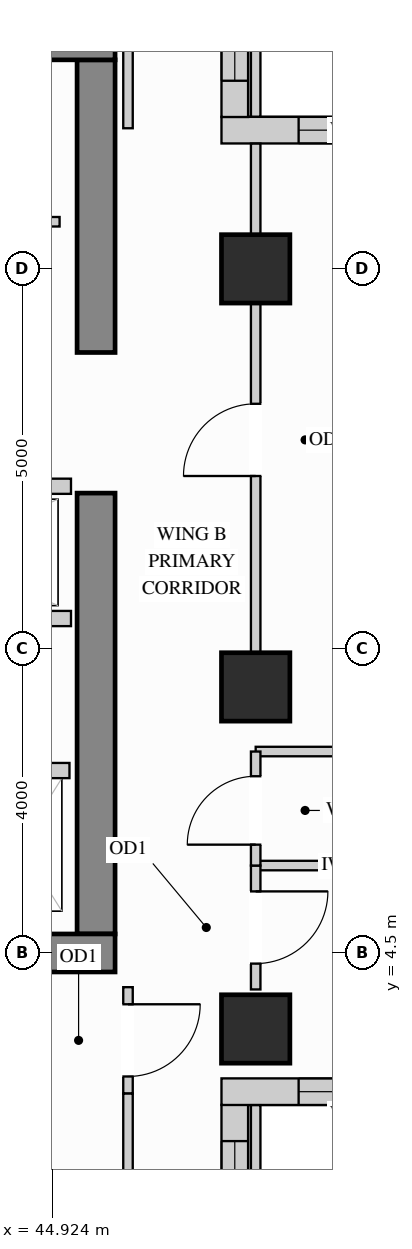
"""IFC4 building model, lengths in metres.
Left out: names, types, materials, properties, quantities, classifications, styles, units other than length and angle.
Written with IfcOpenShell. Run it as: python <this file> out.ifc"""

import sys

from ifc_helpers import new_model, si_unit, direction, frame, frame_2d, origin, origin_2d, place, context, subcontext, project, spatial, rectangle, extrude, source, transform, mapped, element, fill, save


model = new_model("IFC4")
c1 = context("Model", 3, precision=1e-05, world=origin(), true_north=direction((0.0, 1.0)))
c2 = subcontext(c1, "Body", "Model", "MODEL_VIEW")
j1 = project(units=[si_unit("LENGTHUNIT", "METRE"), si_unit("PLANEANGLEUNIT", "RADIAN")], contexts=[c1])
p1 = place(None, origin())
s1 = spatial("IfcSite", under=j1, at=p1, CompositionType="ELEMENT")
p2 = place(p1, origin())
s2 = spatial("IfcBuilding", under=s1, at=p2, CompositionType="ELEMENT")
p3 = place(p2, frame((0.0, 0.0, 212.4)))
s3 = spatial("IfcBuildingStorey", under=s2, at=p3, CompositionType="ELEMENT", Elevation=212.4)
m1 = source(origin(), c2, "Body", "SweptSolid", [
    extrude(rectangle(XDim=0.9, YDim=0.9, at=origin_2d()), origin(), (0.0, 0.0, 1.0), 3.4),
])
for number, where, z_axis, x_axis in (
    (1, (47.6, 13.5, 0.0), (0.0, 0.0, 1.0), (1.0, 0.0, 0.0)),
    (2, (47.6, 3.5, 0.0), (0.0, 0.0, 1.0), (1.0, 0.0, 0.0)),
    (3, (47.6, 8.0, 0.0), (0.0, 0.0, 1.0), (1.0, 0.0, 0.0)),
):
    element("IfcColumn", number, at=place(p3, frame(where, z_axis=z_axis, x_axis=x_axis)), inside=s3, PredefinedType="COLUMN", context=c2, shape_type="MappedRepresentation", body=[
        mapped(m1, transform((0.0, 0.0, 0.0), x_axis=(1.0, 0.0, 0.0), y_axis=(0.0, 1.0, 0.0), z_axis=(0.0, 0.0, 1.0))),
    ])
m2 = source(origin(), c2, "Body", "SweptSolid", [
    extrude(rectangle(XDim=5.8, YDim=0.5, at=frame_2d((2.9, 0.0))), origin(), (0.0, 0.0, 1.0), 3.4),
])
p4 = place(p3, frame((45.5, 4.75, 0.0), z_axis=(0.0, 0.0, 1.0), x_axis=(0.0, 1.0, 0.0)))
e4 = element("IfcWall", 4, at=p4, inside=s3, PredefinedType="SHEAR", context=c2, shape_type="MappedRepresentation", body=[
    mapped(m2, transform((0.0, 0.0, 0.0), x_axis=(1.0, 0.0, 0.0), y_axis=(0.0, 1.0, 0.0), z_axis=(0.0, 0.0, 1.0))),
])
m3 = source(origin(), c2, "Body", "SweptSolid", [
    extrude(rectangle(XDim=3.85, YDim=0.5, at=frame_2d((1.925, 0.0))), origin(), (0.0, 0.0, 1.0), 3.4),
])
p5 = place(p3, frame((45.5, 12.4, 0.0), z_axis=(0.0, 0.0, 1.0), x_axis=(0.0, 1.0, 0.0)))
e5 = element("IfcWall", 5, at=p5, inside=s3, PredefinedType="SHEAR", context=c2, shape_type="MappedRepresentation", body=[
    mapped(m3, transform((0.0, 0.0, 0.0), x_axis=(1.0, 0.0, 0.0), y_axis=(0.0, 1.0, 0.0), z_axis=(0.0, 0.0, 1.0))),
])
m4 = source(origin(), c2, "Body", "SweptSolid", [
    extrude(rectangle(XDim=10.0, YDim=0.5, at=frame_2d((5.0, 0.0))), origin(), (0.0, 0.0, 1.0), 3.4),
])
for number, where, z_axis, x_axis in (
    (6, (35.75, 16.5, 0.0), (0.0, 0.0, 1.0), (1.0, 0.0, 0.0)),
    (7, (35.75, 4.5, 0.0), (0.0, 0.0, 1.0), (1.0, 0.0, 0.0)),
):
    element("IfcWall", number, at=place(p3, frame(where, z_axis=z_axis, x_axis=x_axis)), inside=s3, PredefinedType="SHEAR", context=c2, shape_type="MappedRepresentation", body=[
        mapped(m4, transform((0.0, 0.0, 0.0), x_axis=(1.0, 0.0, 0.0), y_axis=(0.0, 1.0, 0.0), z_axis=(0.0, 0.0, 1.0))),
    ])
p6 = place(p3, frame((47.325, 0.348, 0.0), z_axis=(0.0, 0.0, 1.0), x_axis=(0.0, 1.0, 0.0)))
e8 = element("IfcWall", 8, at=p6, inside=s3, PredefinedType="SOLIDWALL", context=c2, shape_type="SweptSolid", body=[
    extrude(rectangle(XDim=2.154, YDim=0.35, at=frame_2d((1.077, 0.0))), origin(), (0.0, 0.0, 1.0), 3.385),
])
p7 = place(p6, frame((0.477, 0.0, 0.78)))
e9 = element("IfcOpeningElement", 9, at=p7, cuts=e8, PredefinedType="OPENING", context=c2, shape_type="SweptSolid", body=[
    extrude(rectangle(XDim=1.2, YDim=2.1, at=frame_2d((0.6, 1.05))), frame((0.0, 0.185, 0.0), z_axis=(0.0, -1.0, 0.0), x_axis=(1.0, 0.0, 0.0)), (0.0, 0.0, 1.0), 0.37),
])
p8 = place(p3, frame((47.15, 2.675, 0.0), z_axis=(0.0, 0.0, 1.0), x_axis=(1.0, 0.0, 0.0)))
e10 = element("IfcWall", 10, at=p8, inside=s3, PredefinedType="SOLIDWALL", context=c2, shape_type="SweptSolid", body=[
    extrude(rectangle(XDim=2.85, YDim=0.35, at=frame_2d((1.425, 0.0))), origin(), (0.0, 0.0, 1.0), 3.385),
])
p9 = place(p8, frame((1.015, 0.0, 0.78)))
e11 = element("IfcOpeningElement", 11, at=p9, cuts=e10, PredefinedType="OPENING", context=c2, shape_type="SweptSolid", body=[
    extrude(rectangle(XDim=1.2, YDim=2.1, at=frame_2d((0.6, 1.05))), frame((0.0, 0.185, 0.0), z_axis=(0.0, -1.0, 0.0), x_axis=(1.0, 0.0, 0.0)), (0.0, 0.0, 1.0), 0.37),
])
p10 = place(p3, frame((50.0, 15.325, 0.0), z_axis=(0.0, 0.0, 1.0), x_axis=(-1.0, 0.0, 0.0)))
e12 = element("IfcWall", 12, at=p10, inside=s3, PredefinedType="SOLIDWALL", context=c2, shape_type="SweptSolid", body=[
    extrude(rectangle(XDim=2.85, YDim=0.35, at=frame_2d((1.425, 0.0))), origin(), (0.0, 0.0, 1.0), 3.385),
])
p11 = place(p10, frame((0.635, 0.0, 0.78)))
e13 = element("IfcOpeningElement", 13, at=p11, cuts=e12, PredefinedType="OPENING", context=c2, shape_type="SweptSolid", body=[
    extrude(rectangle(XDim=1.2, YDim=2.1, at=frame_2d((0.6, 1.05))), frame((0.0, 0.185, 0.0), z_axis=(0.0, -1.0, 0.0), x_axis=(1.0, 0.0, 0.0)), (0.0, 0.0, 1.0), 0.37),
])
p12 = place(p3, frame((47.325, 15.498, 0.0), z_axis=(0.0, 0.0, 1.0), x_axis=(0.0, 1.0, 0.0)))
e14 = element("IfcWall", 14, at=p12, inside=s3, PredefinedType="SOLIDWALL", context=c2, shape_type="SweptSolid", body=[
    extrude(rectangle(XDim=2.154, YDim=0.35, at=frame_2d((1.077, 0.0))), origin(), (0.0, 0.0, 1.0), 3.385),
])
p13 = place(p12, frame((0.477, 0.0, 0.78)))
e15 = element("IfcOpeningElement", 15, at=p13, cuts=e14, PredefinedType="OPENING", context=c2, shape_type="SweptSolid", body=[
    extrude(rectangle(XDim=1.2, YDim=2.1, at=frame_2d((0.6, 1.05))), frame((0.0, 0.185, 0.0), z_axis=(0.0, -1.0, 0.0), x_axis=(1.0, 0.0, 0.0)), (0.0, 0.0, 1.0), 0.37),
])
p14 = place(p3, frame((36.5, 14.12, 0.0), z_axis=(0.0, 0.0, 1.0), x_axis=(1.0, 0.0, 0.0)))
e16 = element("IfcWall", 16, at=p14, inside=s3, PredefinedType="PARTITIONING", context=c2, shape_type="SweptSolid", body=[
    extrude(rectangle(XDim=8.52, YDim=0.125, at=frame_2d((4.26, 0.0))), origin(), (0.0, 0.0, 1.0), 3.385),
])
p15 = place(p14, frame((3.785, 0.0, 0.0)))
e17 = element("IfcOpeningElement", 17, at=p15, cuts=e16, PredefinedType="OPENING", context=c2, shape_type="SweptSolid", body=[
    extrude(rectangle(XDim=0.95, YDim=2.15, at=frame_2d((0.475, 1.075))), frame((0.0, 0.073, 0.0), z_axis=(0.0, -1.0, 0.0), x_axis=(1.0, 0.0, 0.0)), (0.0, 0.0, 1.0), 0.145),
])
m5 = source(origin(), c2, "Body", "SweptSolid", [
    extrude(rectangle(XDim=2.048, YDim=0.125, at=frame_2d((1.024, 0.0))), origin(), (0.0, 0.0, 1.0), 3.385),
])
for number, where, z_axis, x_axis in (
    (18, (47.6, 5.65, 0.0), (0.0, 0.0, 1.0), (1.0, 0.0, 0.0)),
    (19, (47.6, 7.15, 0.0), (0.0, 0.0, 1.0), (1.0, 0.0, 0.0)),
):
    element("IfcWall", number, at=place(p3, frame(where, z_axis=z_axis, x_axis=x_axis)), inside=s3, PredefinedType="PARTITIONING", context=c2, shape_type="MappedRepresentation", body=[
        mapped(m5, transform((0.0, 0.0, 0.0), x_axis=(1.0, 0.0, 0.0), y_axis=(0.0, 1.0, 0.0), z_axis=(0.0, 0.0, 1.0))),
    ])
p16 = place(p3, frame((47.6, 4.02, 0.0), z_axis=(0.0, 0.0, 1.0), x_axis=(0.0, 1.0, 0.0)))
e20 = element("IfcWall", 20, at=p16, inside=s3, PredefinedType="PARTITIONING", context=c2, shape_type="SweptSolid", body=[
    extrude(rectangle(XDim=1.63, YDim=0.125, at=frame_2d((0.815, 0.0))), origin(), (0.0, 0.0, 1.0), 2.773),
])
p17 = place(p16, frame((0.34, 0.0, 0.0)))
e21 = element("IfcOpeningElement", 21, at=p17, cuts=e20, PredefinedType="OPENING", context=c2, shape_type="SweptSolid", body=[
    extrude(rectangle(XDim=0.95, YDim=2.15, at=frame_2d((0.475, 1.075))), frame((0.0, 0.073, 0.0), z_axis=(0.0, -1.0, 0.0), x_axis=(1.0, 0.0, 0.0)), (0.0, 0.0, 1.0), 0.145),
])
m6 = source(origin(), c2, "Body", "SweptSolid", [
    extrude(rectangle(XDim=2.148, YDim=0.125, at=frame_2d((1.074, 0.0))), origin(), (0.0, 0.0, 1.0), 3.385),
])
p18 = place(p3, frame((47.6, 0.35, 0.0), z_axis=(0.0, 0.0, 1.0), x_axis=(0.0, 1.0, 0.0)))
e22 = element("IfcWall", 22, at=p18, inside=s3, PredefinedType="PARTITIONING", context=c2, shape_type="MappedRepresentation", body=[
    mapped(m6, transform((0.0, 0.0, 0.0), x_axis=(1.0, 0.0, 0.0), y_axis=(0.0, 1.0, 0.0), z_axis=(0.0, 0.0, 1.0))),
])
p19 = place(p3, frame((47.6, 8.45, 0.0), z_axis=(0.0, 0.0, 1.0), x_axis=(0.0, 1.0, 0.0)))
e23 = element("IfcWall", 23, at=p19, inside=s3, PredefinedType="PARTITIONING", context=c2, shape_type="SweptSolid", body=[
    extrude(rectangle(XDim=4.6, YDim=0.125, at=frame_2d((2.3, 0.0))), origin(), (0.0, 0.0, 1.0), 2.773),
])
p20 = place(p19, frame((2.325, 0.0, 0.0)))
e24 = element("IfcOpeningElement", 24, at=p20, cuts=e23, PredefinedType="OPENING", context=c2, shape_type="SweptSolid", body=[
    extrude(rectangle(XDim=0.95, YDim=2.15, at=frame_2d((0.475, 1.075))), frame((0.0, 0.073, 0.0), z_axis=(0.0, -1.0, 0.0), x_axis=(1.0, 0.0, 0.0)), (0.0, 0.0, 1.0), 0.145),
])
m7 = source(origin(), c2, "Body", "SweptSolid", [
    extrude(rectangle(XDim=1.198, YDim=0.125, at=frame_2d((0.599, 0.0))), origin(), (0.0, 0.0, 1.0), 3.385),
])
p21 = place(p3, frame((47.6, 13.95, 0.0), z_axis=(0.0, 0.0, 1.0), x_axis=(0.0, 1.0, 0.0)))
e25 = element("IfcWall", 25, at=p21, inside=s3, PredefinedType="PARTITIONING", context=c2, shape_type="MappedRepresentation", body=[
    mapped(m7, transform((0.0, 0.0, 0.0), x_axis=(1.0, 0.0, 0.0), y_axis=(0.0, 1.0, 0.0), z_axis=(0.0, 0.0, 1.0))),
])
p22 = place(p3, frame((47.6, 15.502, 0.0), z_axis=(0.0, 0.0, 1.0), x_axis=(0.0, 1.0, 0.0)))
e26 = element("IfcWall", 26, at=p22, inside=s3, PredefinedType="PARTITIONING", context=c2, shape_type="MappedRepresentation", body=[
    mapped(m6, transform((0.0, 0.0, 0.0), x_axis=(1.0, 0.0, 0.0), y_axis=(0.0, 1.0, 0.0), z_axis=(0.0, 0.0, 1.0))),
])
p23 = place(p3, frame((47.6, 5.65, 0.0), z_axis=(0.0, 0.0, 1.0), x_axis=(0.0, 1.0, 0.0)))
e27 = element("IfcWall", 27, at=p23, inside=s3, PredefinedType="PARTITIONING", context=c2, shape_type="SweptSolid", body=[
    extrude(rectangle(XDim=1.5, YDim=0.125, at=frame_2d((0.75, 0.0))), origin(), (0.0, 0.0, 1.0), 2.773),
])
p24 = place(p23, frame((0.275, 0.0, 0.0)))
e28 = element("IfcOpeningElement", 28, at=p24, cuts=e27, PredefinedType="OPENING", context=c2, shape_type="SweptSolid", body=[
    extrude(rectangle(XDim=0.9, YDim=2.15, at=frame_2d((0.45, 1.075))), frame((0.0, 0.073, 0.0), z_axis=(0.0, -1.0, 0.0), x_axis=(1.0, 0.0, 0.0)), (0.0, 0.0, 1.0), 0.145),
])
m8 = source(origin(), c2, "Body", "SweptSolid", [
    extrude(rectangle(XDim=2.298, YDim=0.125, at=frame_2d((1.149, 0.0))), origin(), (0.0, 0.0, 1.0), 3.385),
])
p25 = place(p3, frame((45.92, 15.35, 0.0), z_axis=(0.0, 0.0, 1.0), x_axis=(0.0, 1.0, 0.0)))
e29 = element("IfcWall", 29, at=p25, inside=s3, PredefinedType="PARTITIONING", context=c2, shape_type="MappedRepresentation", body=[
    mapped(m8, transform((0.0, 0.0, 0.0), x_axis=(1.0, 0.0, 0.0), y_axis=(0.0, 1.0, 0.0), z_axis=(0.0, 0.0, 1.0))),
])
p26 = place(p3, frame((45.92, 2.65, 0.0), z_axis=(0.0, 0.0, 1.0), x_axis=(0.0, 1.0, 0.0)))
e30 = element("IfcWall", 30, at=p26, inside=s3, PredefinedType="PARTITIONING", context=c2, shape_type="SweptSolid", body=[
    extrude(rectangle(XDim=1.4, YDim=0.125, at=frame_2d((0.7, 0.0))), origin(), (0.0, 0.0, 1.0), 3.385),
])
p27 = place(p26, frame((0.225, 0.0, 0.0)))
e31 = element("IfcOpeningElement", 31, at=p27, cuts=e30, PredefinedType="OPENING", context=c2, shape_type="SweptSolid", body=[
    extrude(rectangle(XDim=0.95, YDim=2.15, at=frame_2d((0.475, 1.075))), frame((0.0, 0.073, 0.0), z_axis=(0.0, -1.0, 0.0), x_axis=(1.0, 0.0, 0.0)), (0.0, 0.0, 1.0), 0.145),
])
p28 = place(p3, frame((45.92, 0.352, 0.0), z_axis=(0.0, 0.0, 1.0), x_axis=(0.0, 1.0, 0.0)))
e32 = element("IfcWall", 32, at=p28, inside=s3, PredefinedType="PARTITIONING", context=c2, shape_type="MappedRepresentation", body=[
    mapped(m8, transform((0.0, 0.0, 0.0), x_axis=(1.0, 0.0, 0.0), y_axis=(0.0, 1.0, 0.0), z_axis=(0.0, 0.0, 1.0))),
])
m9 = source(origin(), c2, "Body", "SweptSolid", [
    extrude(rectangle(XDim=1.3, YDim=0.2, at=frame_2d((0.65, 0.0))), origin(), (0.0, 0.0, 1.0), 3.385),
])
p29 = place(p3, frame((43.85, 6.9, 0.0), z_axis=(0.0, 0.0, 1.0), x_axis=(1.0, 0.0, 0.0)))
e33 = element("IfcWall", 33, at=p29, inside=s3, PredefinedType="PARTITIONING", context=c2, shape_type="MappedRepresentation", body=[
    mapped(m9, transform((0.0, 0.0, 0.0), x_axis=(1.0, 0.0, 0.0), y_axis=(0.0, 1.0, 0.0), z_axis=(0.0, 0.0, 1.0))),
])
m10 = source(origin(), c2, "Body", "SweptSolid", [
    extrude(rectangle(XDim=3.49, YDim=0.2, at=frame_2d((1.745, 0.0))), origin(), (0.0, 0.0, 1.0), 3.385),
])
for number, where, z_axis, x_axis in (
    (34, (41.68, 10.64, 0.0), (0.0, 0.0, 1.0), (1.0, 0.0, 0.0)),
    (35, (41.68, 8.9, 0.0), (0.0, 0.0, 1.0), (1.0, 0.0, 0.0)),
):
    element("IfcWall", number, at=place(p3, frame(where, z_axis=z_axis, x_axis=x_axis)), inside=s3, PredefinedType="PARTITIONING", context=c2, shape_type="MappedRepresentation", body=[
        mapped(m10, transform((0.0, 0.0, 0.0), x_axis=(1.0, 0.0, 0.0), y_axis=(0.0, 1.0, 0.0), z_axis=(0.0, 0.0, 1.0))),
    ])
m11 = source(origin(), c2, "Body", "SweptSolid", [
    extrude(rectangle(XDim=0.95, YDim=2.15, at=frame_2d((0.475, 1.075))), frame((0.0, 0.025, 0.0), z_axis=(0.0, -1.0, 0.0), x_axis=(1.0, 0.0, 0.0)), (0.0, 0.0, 1.0), 0.05),
])
p30 = place(p27, origin())
e36 = element("IfcDoor", 36, at=p30, inside=s3, OperationType="SINGLE_SWING_RIGHT", PredefinedType="DOOR", context=c2, shape_type="MappedRepresentation", body=[
    mapped(m11, transform((0.0, 0.0, 0.0), x_axis=(1.0, 0.0, 0.0), y_axis=(0.0, 1.0, 0.0), z_axis=(0.0, 0.0, 1.0))),
])
fill(e31, e36)
p31 = place(p17, origin())
e37 = element("IfcDoor", 37, at=p31, inside=s3, OperationType="SINGLE_SWING_RIGHT", PredefinedType="DOOR", context=c2, shape_type="MappedRepresentation", body=[
    mapped(m11, transform((0.0, 0.0, 0.0), x_axis=(1.0, 0.0, 0.0), y_axis=(0.0, 1.0, 0.0), z_axis=(0.0, 0.0, 1.0))),
])
fill(e21, e37)
p32 = place(p20, origin())
e38 = element("IfcDoor", 38, at=p32, inside=s3, OperationType="SINGLE_SWING_LEFT", PredefinedType="DOOR", context=c2, shape_type="MappedRepresentation", body=[
    mapped(m11, transform((0.0, 0.0, 0.0), x_axis=(1.0, 0.0, 0.0), y_axis=(0.0, 1.0, 0.0), z_axis=(0.0, 0.0, 1.0))),
])
fill(e24, e38)
m12 = source(origin(), c2, "Body", "SweptSolid", [
    extrude(rectangle(XDim=0.9, YDim=2.15, at=frame_2d((0.45, 1.075))), frame((0.0, 0.025, 0.0), z_axis=(0.0, -1.0, 0.0), x_axis=(1.0, 0.0, 0.0)), (0.0, 0.0, 1.0), 0.05),
])
p33 = place(p24, origin())
e39 = element("IfcDoor", 39, at=p33, inside=s3, OperationType="SINGLE_SWING_LEFT", PredefinedType="DOOR", context=c2, shape_type="MappedRepresentation", body=[
    mapped(m12, transform((0.0, 0.0, 0.0), x_axis=(1.0, 0.0, 0.0), y_axis=(0.0, 1.0, 0.0), z_axis=(0.0, 0.0, 1.0))),
])
fill(e28, e39)
m13 = source(origin(), c2, "Body", "SweptSolid", [
    extrude(rectangle(XDim=1.2, YDim=2.1, at=frame_2d((0.6, 1.05))), frame((0.0, 0.03, 0.0), z_axis=(0.0, -1.0, 0.0), x_axis=(1.0, 0.0, 0.0)), (0.0, 0.0, 1.0), 0.06),
])
p34 = place(p7, origin())
e40 = element("IfcWindow", 40, at=p34, inside=s3, PartitioningType="SINGLE_PANEL", PredefinedType="WINDOW", context=c2, shape_type="MappedRepresentation", body=[
    mapped(m13, transform((0.0, 0.0, 0.0), x_axis=(1.0, 0.0, 0.0), y_axis=(0.0, 1.0, 0.0), z_axis=(0.0, 0.0, 1.0))),
])
fill(e9, e40)
p35 = place(p9, origin())
e41 = element("IfcWindow", 41, at=p35, inside=s3, PartitioningType="SINGLE_PANEL", PredefinedType="WINDOW", context=c2, shape_type="MappedRepresentation", body=[
    mapped(m13, transform((0.0, 0.0, 0.0), x_axis=(1.0, 0.0, 0.0), y_axis=(0.0, 1.0, 0.0), z_axis=(0.0, 0.0, 1.0))),
])
fill(e11, e41)
p36 = place(p11, origin())
e42 = element("IfcWindow", 42, at=p36, inside=s3, PartitioningType="SINGLE_PANEL", PredefinedType="WINDOW", context=c2, shape_type="MappedRepresentation", body=[
    mapped(m13, transform((0.0, 0.0, 0.0), x_axis=(1.0, 0.0, 0.0), y_axis=(0.0, 1.0, 0.0), z_axis=(0.0, 0.0, 1.0))),
])
fill(e13, e42)
p37 = place(p13, origin())
e43 = element("IfcWindow", 43, at=p37, inside=s3, PartitioningType="SINGLE_PANEL", PredefinedType="WINDOW", context=c2, shape_type="MappedRepresentation", body=[
    mapped(m13, transform((0.0, 0.0, 0.0), x_axis=(1.0, 0.0, 0.0), y_axis=(0.0, 1.0, 0.0), z_axis=(0.0, 0.0, 1.0))),
])
fill(e15, e43)
save(model, sys.argv[1])
